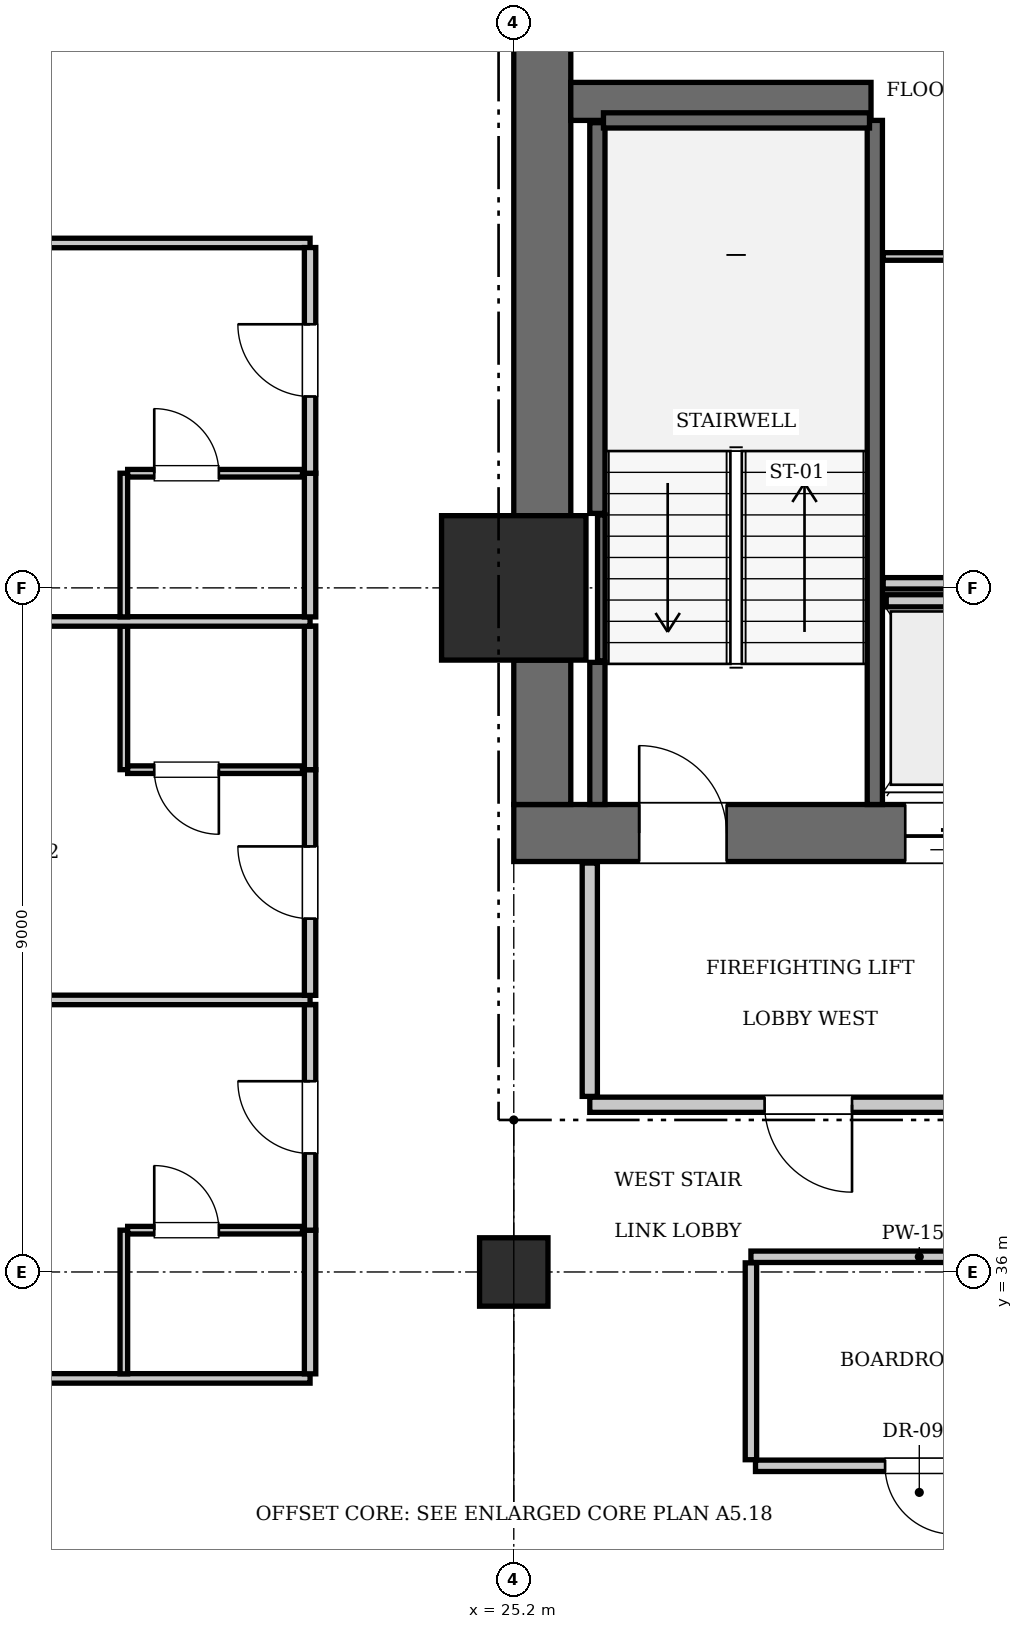
"""IFC4 building model, lengths in metres.
Left out: names, types, materials, properties, quantities, classifications, styles, units other than length and angle.
Written with IfcOpenShell. Run it as: python <this file> out.ifc"""

import sys

from ifc_helpers import new_model, si_unit, direction, frame, frame_2d, origin, origin_2d, place, context, subcontext, project, spatial, rectangle, extrude, element, fill, save


model = new_model("IFC4")
c1 = context("Model", 3, precision=1e-05, world=origin(), true_north=direction((0.0, 1.0)))
c2 = subcontext(c1, "Body", "Model", "MODEL_VIEW")
j1 = project(units=[si_unit("LENGTHUNIT", "METRE"), si_unit("PLANEANGLEUNIT", "RADIAN")], contexts=[c1])
p1 = place(None, origin())
s1 = spatial("IfcSite", under=j1, at=p1, CompositionType="ELEMENT")
p2 = place(p1, origin())
s2 = spatial("IfcBuilding", under=s1, at=p2, CompositionType="ELEMENT")
p3 = place(p2, frame((0.0, 0.0, 212.1)))
s3 = spatial("IfcBuildingStorey", under=s2, at=p3, CompositionType="ELEMENT", Elevation=212.1)
p4 = place(p3, frame((25.2, 45.0, 0.0), z_axis=(0.0, 0.0, 1.0), x_axis=(1.0, 0.0, 0.0)))
e1 = element("IfcColumn", 1, at=p4, inside=s3, PredefinedType="COLUMN", context=c2, shape_type="SweptSolid", body=[
    extrude(rectangle(XDim=1.9, YDim=1.9, at=origin_2d()), origin(), (0.0, 0.0, 1.0), 3.85),
])
p5 = place(p3, frame((25.2, 41.775, 0.0), z_axis=(0.0, 0.0, 1.0), x_axis=(1.0, 0.0, 0.0)))
e2 = element("IfcWall", 2, at=p5, inside=s3, PredefinedType="SHEAR", context=c2, shape_type="SweptSolid", body=[
    extrude(rectangle(XDim=6.8, YDim=0.75, at=frame_2d((3.4, 0.0))), origin(), (0.0, 0.0, 1.0), 3.85),
])
p6 = place(p5, frame((1.65, 0.0, 0.0)))
e3 = element("IfcOpeningElement", 3, at=p6, cuts=e2, PredefinedType="OPENING", context=c2, shape_type="SweptSolid", body=[
    extrude(rectangle(XDim=1.15, YDim=2.15, at=frame_2d((0.575, 1.075))), frame((0.0, 0.385, 0.0), z_axis=(0.0, -1.0, 0.0), x_axis=(1.0, 0.0, 0.0)), (0.0, 0.0, 1.0), 0.77),
])
p7 = place(p5, frame((5.15, 0.0, 0.0)))
e4 = element("IfcOpeningElement", 4, at=p7, cuts=e2, PredefinedType="OPENING", context=c2, shape_type="SweptSolid", body=[
    extrude(rectangle(XDim=1.1, YDim=2.2, at=frame_2d((0.55, 1.1))), frame((0.0, 0.385, 0.0), z_axis=(0.0, -1.0, 0.0), x_axis=(1.0, 0.0, 0.0)), (0.0, 0.0, 1.0), 0.77),
])
p8 = place(p3, frame((25.575, 42.15, 0.0), z_axis=(0.0, 0.0, 1.0), x_axis=(0.0, 1.0, 0.0)))
e5 = element("IfcWall", 5, at=p8, inside=s3, PredefinedType="SHEAR", context=c2, shape_type="SweptSolid", body=[
    extrude(rectangle(XDim=1.9, YDim=0.75, at=frame_2d((0.95, 0.0))), origin(), (0.0, 0.0, 1.0), 3.85),
])
p9 = place(p3, frame((25.575, 45.95, 0.0), z_axis=(0.0, 0.0, 1.0), x_axis=(0.0, 1.0, 0.0)))
e6 = element("IfcWall", 6, at=p9, inside=s3, PredefinedType="SHEAR", context=c2, shape_type="SweptSolid", body=[
    extrude(rectangle(XDim=7.3, YDim=0.75, at=frame_2d((3.65, 0.0))), origin(), (0.0, 0.0, 1.0), 3.85),
])
p10 = place(p3, frame((25.95, 51.4, 0.0), z_axis=(0.0, 0.0, 1.0), x_axis=(1.0, 0.0, 0.0)))
e7 = element("IfcWall", 7, at=p10, inside=s3, PredefinedType="SHEAR", context=c2, shape_type="SweptSolid", body=[
    extrude(rectangle(XDim=3.95, YDim=0.5, at=frame_2d((1.975, 0.0))), origin(), (0.0, 0.0, 1.0), 3.85),
])
p11 = place(p3, frame((25.2, 36.0, 0.0), z_axis=(0.0, 0.0, 1.0), x_axis=(1.0, 0.0, 0.0)))
e8 = element("IfcColumn", 8, at=p11, inside=s3, PredefinedType="COLUMN", context=c2, shape_type="SweptSolid", body=[
    extrude(rectangle(XDim=0.9, YDim=0.9, at=origin_2d()), origin(), (0.0, 0.0, 1.0), 3.85),
])
p12 = place(p3, frame((29.95, 42.15, 0.0), z_axis=(0.0, 0.0, 1.0), x_axis=(0.0, 1.0, 0.0)))
e9 = element("IfcWall", 9, at=p12, inside=s3, PredefinedType="SOLIDWALL", context=c2, shape_type="SweptSolid", body=[
    extrude(rectangle(XDim=9.0, YDim=0.2, at=frame_2d((4.5, 0.0))), origin(), (0.0, 0.0, 1.0), 3.61),
])
p13 = place(p3, frame((26.3, 42.15, 0.0), z_axis=(0.0, 0.0, 1.0), x_axis=(0.0, 1.0, 0.0)))
e10 = element("IfcWall", 10, at=p13, inside=s3, PredefinedType="SOLIDWALL", context=c2, shape_type="SweptSolid", body=[
    extrude(rectangle(XDim=1.87, YDim=0.2, at=frame_2d((0.935, 0.0))), origin(), (0.0, 0.0, 1.0), 3.61),
])
p14 = place(p3, frame((26.3, 45.98, 0.0), z_axis=(0.0, 0.0, 1.0), x_axis=(0.0, 1.0, 0.0)))
e11 = element("IfcWall", 11, at=p14, inside=s3, PredefinedType="SOLIDWALL", context=c2, shape_type="SweptSolid", body=[
    extrude(rectangle(XDim=5.14, YDim=0.2, at=frame_2d((2.57, 0.0))), origin(), (0.0, 0.0, 1.0), 3.61),
])
p15 = place(p3, frame((26.38, 51.15, 0.0), z_axis=(0.0, 0.0, 1.0), x_axis=(1.0, 0.0, 0.0)))
e12 = element("IfcWall", 12, at=p15, inside=s3, PredefinedType="SOLIDWALL", context=c2, shape_type="SweptSolid", body=[
    extrude(rectangle(XDim=3.5, YDim=0.2, at=frame_2d((1.75, 0.0))), origin(), (0.0, 0.0, 1.0), 3.61),
])
p16 = place(p3, frame((26.352, 44.04, 0.0), z_axis=(0.0, 0.0, 1.0), x_axis=(0.0, 1.0, 0.0)))
e13 = element("IfcWall", 13, at=p16, inside=s3, PredefinedType="SOLIDWALL", context=c2, shape_type="SweptSolid", body=[
    extrude(rectangle(XDim=1.92, YDim=0.1, at=frame_2d((0.96, 0.0))), origin(), (0.0, 0.0, 1.0), 3.61),
])
p17 = place(p3, frame((30.1, 44.83, 0.0), z_axis=(0.0, 0.0, 1.0), x_axis=(1.0, 0.0, 0.0)))
e14 = element("IfcWall", 14, at=p17, inside=s3, PredefinedType="SOLIDWALL", context=c2, shape_type="SweptSolid", body=[
    extrude(rectangle(XDim=1.6, YDim=0.16, at=frame_2d((0.8, 0.0))), origin(), (0.0, 0.0, 1.0), 3.61),
])
p18 = place(p3, frame((26.2, 38.2, 0.0), z_axis=(0.0, 0.0, 1.0), x_axis=(1.0, 0.0, 0.0)))
e15 = element("IfcWall", 15, at=p18, inside=s3, PredefinedType="PARTITIONING", context=c2, shape_type="SweptSolid", body=[
    extrude(rectangle(XDim=5.8, YDim=0.2, at=frame_2d((2.9, 0.0))), origin(), (0.0, 0.0, 1.0), 3.61),
])
p19 = place(p18, frame((2.3, 0.0, 0.0)))
e16 = element("IfcOpeningElement", 16, at=p19, cuts=e15, PredefinedType="OPENING", context=c2, shape_type="SweptSolid", body=[
    extrude(rectangle(XDim=1.15, YDim=2.15, at=frame_2d((0.575, 1.075))), frame((0.0, 0.11, 0.0), z_axis=(0.0, -1.0, 0.0), x_axis=(1.0, 0.0, 0.0)), (0.0, 0.0, 1.0), 0.22),
])
p20 = place(p3, frame((26.2, 38.31, 0.0), z_axis=(0.0, 0.0, 1.0), x_axis=(0.0, 1.0, 0.0)))
e17 = element("IfcWall", 17, at=p20, inside=s3, PredefinedType="PARTITIONING", context=c2, shape_type="SweptSolid", body=[
    extrude(rectangle(XDim=3.07, YDim=0.2, at=frame_2d((1.535, 0.0))), origin(), (0.0, 0.0, 1.0), 3.61),
])
p21 = place(p3, frame((30.06, 45.06, 0.0), z_axis=(0.0, 0.0, 1.0), x_axis=(1.0, 0.0, 0.0)))
e18 = element("IfcWall", 18, at=p21, inside=s3, PredefinedType="PARTITIONING", context=c2, shape_type="SweptSolid", body=[
    extrude(rectangle(XDim=3.18, YDim=0.15, at=frame_2d((1.59, 0.0))), origin(), (0.0, 0.0, 1.0), 3.61),
])
p22 = place(p3, frame((30.06, 49.36, 0.0), z_axis=(0.0, 0.0, 1.0), x_axis=(1.0, 0.0, 0.0)))
e19 = element("IfcWall", 19, at=p22, inside=s3, PredefinedType="PARTITIONING", context=c2, shape_type="SweptSolid", body=[
    extrude(rectangle(XDim=3.18, YDim=0.1, at=frame_2d((1.59, 0.0))), origin(), (0.0, 0.0, 1.0), 3.61),
])
p23 = place(p22, frame((1.95, 0.0, 0.0)))
e20 = element("IfcOpeningElement", 20, at=p23, cuts=e19, PredefinedType="OPENING", context=c2, shape_type="SweptSolid", body=[
    extrude(rectangle(XDim=0.8, YDim=2.05, at=frame_2d((0.4, 1.025))), frame((0.0, 0.06, 0.0), z_axis=(0.0, -1.0, 0.0), x_axis=(1.0, 0.0, 0.0)), (0.0, 0.0, 1.0), 0.12),
])
p24 = place(p3, frame((28.32, 36.2, 0.0), z_axis=(0.0, 0.0, 1.0), x_axis=(1.0, 0.0, 0.0)))
e21 = element("IfcWall", 21, at=p24, inside=s3, PredefinedType="PARTITIONING", context=c2, shape_type="SweptSolid", body=[
    extrude(rectangle(XDim=4.43, YDim=0.15, at=frame_2d((2.215, 0.0))), origin(), (0.0, 0.0, 1.0), 3.61),
])
p25 = place(p3, frame((28.32, 33.53, 0.0), z_axis=(0.0, 0.0, 1.0), x_axis=(0.0, 1.0, 0.0)))
e22 = element("IfcWall", 22, at=p25, inside=s3, PredefinedType="PARTITIONING", context=c2, shape_type="SweptSolid", body=[
    extrude(rectangle(XDim=2.59, YDim=0.15, at=frame_2d((1.295, 0.0))), origin(), (0.0, 0.0, 1.0), 3.61),
])
p26 = place(p3, frame((28.38, 33.45, 0.0), z_axis=(0.0, 0.0, 1.0), x_axis=(1.0, 0.0, 0.0)))
e23 = element("IfcWall", 23, at=p26, inside=s3, PredefinedType="PARTITIONING", context=c2, shape_type="SweptSolid", body=[
    extrude(rectangle(XDim=4.31, YDim=0.15, at=frame_2d((2.155, 0.0))), origin(), (0.0, 0.0, 1.0), 3.61),
])
p27 = place(p26, frame((1.705, 0.0, 0.0)))
e24 = element("IfcOpeningElement", 24, at=p27, cuts=e23, PredefinedType="OPENING", context=c2, shape_type="SweptSolid", body=[
    extrude(rectangle(XDim=0.9, YDim=2.1, at=frame_2d((0.45, 1.05))), frame((0.0, 0.085, 0.0), z_axis=(0.0, -1.0, 0.0), x_axis=(1.0, 0.0, 0.0)), (0.0, 0.0, 1.0), 0.17),
])
p28 = place(p3, frame((13.2, 34.6, 0.0), z_axis=(0.0, 0.0, 1.0), x_axis=(1.0, 0.0, 0.0)))
e25 = element("IfcWall", 25, at=p28, inside=s3, PredefinedType="PARTITIONING", context=c2, shape_type="SweptSolid", body=[
    extrude(rectangle(XDim=9.32, YDim=0.125, at=frame_2d((4.66, 0.0))), origin(), (0.0, 0.0, 1.0), 3.61),
])
p29 = place(p3, frame((17.24, 49.538, 0.0), z_axis=(0.0, 0.0, 1.0), x_axis=(1.0, 0.0, 0.0)))
e26 = element("IfcWall", 26, at=p29, inside=s3, PredefinedType="PARTITIONING", context=c2, shape_type="SweptSolid", body=[
    extrude(rectangle(XDim=5.28, YDim=0.125, at=frame_2d((2.64, 0.0))), origin(), (0.0, 0.0, 1.0), 3.61),
])
p30 = place(p3, frame((22.52, 34.66, 0.0), z_axis=(0.0, 0.0, 1.0), x_axis=(0.0, 1.0, 0.0)))
e27 = element("IfcWall", 27, at=p30, inside=s3, PredefinedType="PARTITIONING", context=c2, shape_type="SweptSolid", body=[
    extrude(rectangle(XDim=1.89, YDim=0.15, at=frame_2d((0.945, 0.0))), origin(), (0.0, 0.0, 1.0), 3.61),
])
p31 = place(p3, frame((22.52, 36.55, 0.0), z_axis=(0.0, 0.0, 1.0), x_axis=(0.0, 1.0, 0.0)))
e28 = element("IfcWall", 28, at=p31, inside=s3, PredefinedType="PARTITIONING", context=c2, shape_type="SweptSolid", body=[
    extrude(rectangle(XDim=2.969, YDim=0.15, at=frame_2d((1.485, 0.0))), origin(), (0.0, 0.0, 1.0), 3.61),
])
p32 = place(p31, frame((1.01, 0.0, 0.0)))
e29 = element("IfcOpeningElement", 29, at=p32, cuts=e28, PredefinedType="OPENING", context=c2, shape_type="SweptSolid", body=[
    extrude(rectangle(XDim=0.95, YDim=2.15, at=frame_2d((0.475, 1.075))), frame((0.0, 0.085, 0.0), z_axis=(0.0, -1.0, 0.0), x_axis=(1.0, 0.0, 0.0)), (0.0, 0.0, 1.0), 0.17),
])
p33 = place(p3, frame((20.07, 34.66, 0.0), z_axis=(0.0, 0.0, 1.0), x_axis=(0.0, 1.0, 0.0)))
e30 = element("IfcWall", 30, at=p33, inside=s3, PredefinedType="PARTITIONING", context=c2, shape_type="SweptSolid", body=[
    extrude(rectangle(XDim=1.89, YDim=0.1, at=frame_2d((0.945, 0.0))), origin(), (0.0, 0.0, 1.0), 3.61),
])
p34 = place(p3, frame((20.12, 36.55, 0.0), z_axis=(0.0, 0.0, 1.0), x_axis=(1.0, 0.0, 0.0)))
e31 = element("IfcWall", 31, at=p34, inside=s3, PredefinedType="PARTITIONING", context=c2, shape_type="SweptSolid", body=[
    extrude(rectangle(XDim=2.3, YDim=0.1, at=frame_2d((1.15, 0.0))), origin(), (0.0, 0.0, 1.0), 3.61),
])
p35 = place(p34, frame((0.35, 0.0, 0.0)))
e32 = element("IfcOpeningElement", 32, at=p35, cuts=e31, PredefinedType="OPENING", context=c2, shape_type="SweptSolid", body=[
    extrude(rectangle(XDim=0.85, YDim=2.1, at=frame_2d((0.425, 1.05))), frame((0.0, 0.06, 0.0), z_axis=(0.0, -1.0, 0.0), x_axis=(1.0, 0.0, 0.0)), (0.0, 0.0, 1.0), 0.12),
])
p36 = place(p3, frame((13.2, 39.579, 0.0), z_axis=(0.0, 0.0, 1.0), x_axis=(1.0, 0.0, 0.0)))
e33 = element("IfcWall", 33, at=p36, inside=s3, PredefinedType="PARTITIONING", context=c2, shape_type="SweptSolid", body=[
    extrude(rectangle(XDim=9.32, YDim=0.125, at=frame_2d((4.66, 0.0))), origin(), (0.0, 0.0, 1.0), 3.61),
])
p37 = place(p3, frame((22.52, 39.639, 0.0), z_axis=(0.0, 0.0, 1.0), x_axis=(0.0, 1.0, 0.0)))
e34 = element("IfcWall", 34, at=p37, inside=s3, PredefinedType="PARTITIONING", context=c2, shape_type="SweptSolid", body=[
    extrude(rectangle(XDim=2.969, YDim=0.15, at=frame_2d((1.485, 0.0))), origin(), (0.0, 0.0, 1.0), 3.61),
])
p38 = place(p37, frame((1.01, 0.0, 0.0)))
e35 = element("IfcOpeningElement", 35, at=p38, cuts=e34, PredefinedType="OPENING", context=c2, shape_type="SweptSolid", body=[
    extrude(rectangle(XDim=0.95, YDim=2.15, at=frame_2d((0.475, 1.075))), frame((0.0, 0.085, 0.0), z_axis=(0.0, -1.0, 0.0), x_axis=(1.0, 0.0, 0.0)), (0.0, 0.0, 1.0), 0.17),
])
p39 = place(p3, frame((22.52, 42.608, 0.0), z_axis=(0.0, 0.0, 1.0), x_axis=(0.0, 1.0, 0.0)))
e36 = element("IfcWall", 36, at=p39, inside=s3, PredefinedType="PARTITIONING", context=c2, shape_type="SweptSolid", body=[
    extrude(rectangle(XDim=1.89, YDim=0.15, at=frame_2d((0.945, 0.0))), origin(), (0.0, 0.0, 1.0), 3.61),
])
p40 = place(p3, frame((20.07, 42.608, 0.0), z_axis=(0.0, 0.0, 1.0), x_axis=(0.0, 1.0, 0.0)))
e37 = element("IfcWall", 37, at=p40, inside=s3, PredefinedType="PARTITIONING", context=c2, shape_type="SweptSolid", body=[
    extrude(rectangle(XDim=1.89, YDim=0.1, at=frame_2d((0.945, 0.0))), origin(), (0.0, 0.0, 1.0), 3.61),
])
p41 = place(p3, frame((20.12, 42.608, 0.0), z_axis=(0.0, 0.0, 1.0), x_axis=(1.0, 0.0, 0.0)))
e38 = element("IfcWall", 38, at=p41, inside=s3, PredefinedType="PARTITIONING", context=c2, shape_type="SweptSolid", body=[
    extrude(rectangle(XDim=2.3, YDim=0.1, at=frame_2d((1.15, 0.0))), origin(), (0.0, 0.0, 1.0), 3.61),
])
p42 = place(p41, frame((0.35, 0.0, 0.0)))
e39 = element("IfcOpeningElement", 39, at=p42, cuts=e38, PredefinedType="OPENING", context=c2, shape_type="SweptSolid", body=[
    extrude(rectangle(XDim=0.85, YDim=2.1, at=frame_2d((0.425, 1.05))), frame((0.0, 0.06, 0.0), z_axis=(0.0, -1.0, 0.0), x_axis=(1.0, 0.0, 0.0)), (0.0, 0.0, 1.0), 0.12),
])
p43 = place(p3, frame((13.2, 44.558, 0.0), z_axis=(0.0, 0.0, 1.0), x_axis=(1.0, 0.0, 0.0)))
e40 = element("IfcWall", 40, at=p43, inside=s3, PredefinedType="PARTITIONING", context=c2, shape_type="SweptSolid", body=[
    extrude(rectangle(XDim=9.32, YDim=0.125, at=frame_2d((4.66, 0.0))), origin(), (0.0, 0.0, 1.0), 3.61),
])
p44 = place(p3, frame((22.52, 44.618, 0.0), z_axis=(0.0, 0.0, 1.0), x_axis=(0.0, 1.0, 0.0)))
e41 = element("IfcWall", 41, at=p44, inside=s3, PredefinedType="PARTITIONING", context=c2, shape_type="SweptSolid", body=[
    extrude(rectangle(XDim=1.89, YDim=0.15, at=frame_2d((0.945, 0.0))), origin(), (0.0, 0.0, 1.0), 3.61),
])
p45 = place(p3, frame((22.52, 46.508, 0.0), z_axis=(0.0, 0.0, 1.0), x_axis=(0.0, 1.0, 0.0)))
e42 = element("IfcWall", 42, at=p45, inside=s3, PredefinedType="PARTITIONING", context=c2, shape_type="SweptSolid", body=[
    extrude(rectangle(XDim=2.969, YDim=0.15, at=frame_2d((1.485, 0.0))), origin(), (0.0, 0.0, 1.0), 3.61),
])
p46 = place(p45, frame((1.01, 0.0, 0.0)))
e43 = element("IfcOpeningElement", 43, at=p46, cuts=e42, PredefinedType="OPENING", context=c2, shape_type="SweptSolid", body=[
    extrude(rectangle(XDim=0.95, YDim=2.15, at=frame_2d((0.475, 1.075))), frame((0.0, 0.085, 0.0), z_axis=(0.0, -1.0, 0.0), x_axis=(1.0, 0.0, 0.0)), (0.0, 0.0, 1.0), 0.17),
])
p47 = place(p3, frame((20.07, 44.618, 0.0), z_axis=(0.0, 0.0, 1.0), x_axis=(0.0, 1.0, 0.0)))
e44 = element("IfcWall", 44, at=p47, inside=s3, PredefinedType="PARTITIONING", context=c2, shape_type="SweptSolid", body=[
    extrude(rectangle(XDim=1.89, YDim=0.1, at=frame_2d((0.945, 0.0))), origin(), (0.0, 0.0, 1.0), 3.61),
])
p48 = place(p3, frame((20.12, 46.508, 0.0), z_axis=(0.0, 0.0, 1.0), x_axis=(1.0, 0.0, 0.0)))
e45 = element("IfcWall", 45, at=p48, inside=s3, PredefinedType="PARTITIONING", context=c2, shape_type="SweptSolid", body=[
    extrude(rectangle(XDim=2.3, YDim=0.1, at=frame_2d((1.15, 0.0))), origin(), (0.0, 0.0, 1.0), 3.61),
])
p49 = place(p48, frame((0.35, 0.0, 0.0)))
e46 = element("IfcOpeningElement", 46, at=p49, cuts=e45, PredefinedType="OPENING", context=c2, shape_type="SweptSolid", body=[
    extrude(rectangle(XDim=0.85, YDim=2.1, at=frame_2d((0.425, 1.05))), frame((0.0, 0.06, 0.0), z_axis=(0.0, -1.0, 0.0), x_axis=(1.0, 0.0, 0.0)), (0.0, 0.0, 1.0), 0.12),
])
p50 = place(p6, origin())
e47 = element("IfcDoor", 47, at=p50, inside=s3, OperationType="SINGLE_SWING_LEFT", PredefinedType="DOOR", context=c2, shape_type="SweptSolid", body=[
    extrude(rectangle(XDim=1.15, YDim=2.15, at=frame_2d((0.575, 1.075))), frame((0.0, 0.025, 0.0), z_axis=(0.0, -1.0, 0.0), x_axis=(1.0, 0.0, 0.0)), (0.0, 0.0, 1.0), 0.05),
])
fill(e3, e47)
p51 = place(p7, frame((1.1, 0.0, 0.0), z_axis=(0.0, 0.0, 1.0), x_axis=(-1.0, 0.0, 0.0)))
e48 = element("IfcDoor", 48, at=p51, inside=s3, OperationType="SLIDING_TO_LEFT", PredefinedType="DOOR", context=c2, shape_type="SweptSolid", body=[
    extrude(rectangle(XDim=1.1, YDim=2.2, at=frame_2d((0.55, 1.1))), frame((0.0, 0.025, 0.0), z_axis=(0.0, -1.0, 0.0), x_axis=(1.0, 0.0, 0.0)), (0.0, 0.0, 1.0), 0.05),
])
fill(e4, e48)
p52 = place(p19, frame((1.15, 0.0, 0.0), z_axis=(0.0, 0.0, 1.0), x_axis=(-1.0, 0.0, 0.0)))
e49 = element("IfcDoor", 49, at=p52, inside=s3, OperationType="SINGLE_SWING_LEFT", PredefinedType="DOOR", context=c2, shape_type="SweptSolid", body=[
    extrude(rectangle(XDim=1.15, YDim=2.15, at=frame_2d((0.575, 1.075))), frame((0.0, 0.025, 0.0), z_axis=(0.0, -1.0, 0.0), x_axis=(1.0, 0.0, 0.0)), (0.0, 0.0, 1.0), 0.05),
])
fill(e16, e49)
p53 = place(p27, frame((0.9, 0.0, 0.0), z_axis=(0.0, 0.0, 1.0), x_axis=(-1.0, 0.0, 0.0)))
e50 = element("IfcDoor", 50, at=p53, inside=s3, OperationType="SINGLE_SWING_LEFT", PredefinedType="DOOR", context=c2, shape_type="SweptSolid", body=[
    extrude(rectangle(XDim=0.9, YDim=2.1, at=frame_2d((0.45, 1.05))), frame((0.0, 0.025, 0.0), z_axis=(0.0, -1.0, 0.0), x_axis=(1.0, 0.0, 0.0)), (0.0, 0.0, 1.0), 0.05),
])
fill(e24, e50)
p54 = place(p35, origin())
e51 = element("IfcDoor", 51, at=p54, inside=s3, OperationType="SINGLE_SWING_LEFT", PredefinedType="DOOR", context=c2, shape_type="SweptSolid", body=[
    extrude(rectangle(XDim=0.85, YDim=2.1, at=frame_2d((0.425, 1.05))), frame((0.0, 0.025, 0.0), z_axis=(0.0, -1.0, 0.0), x_axis=(1.0, 0.0, 0.0)), (0.0, 0.0, 1.0), 0.05),
])
fill(e32, e51)
p55 = place(p32, origin())
e52 = element("IfcDoor", 52, at=p55, inside=s3, OperationType="SINGLE_SWING_RIGHT", PredefinedType="DOOR", context=c2, shape_type="SweptSolid", body=[
    extrude(rectangle(XDim=0.95, YDim=2.15, at=frame_2d((0.475, 1.075))), frame((0.0, 0.025, 0.0), z_axis=(0.0, -1.0, 0.0), x_axis=(1.0, 0.0, 0.0)), (0.0, 0.0, 1.0), 0.05),
])
fill(e29, e52)
p56 = place(p42, frame((0.85, 0.0, 0.0), z_axis=(0.0, 0.0, 1.0), x_axis=(-1.0, 0.0, 0.0)))
e53 = element("IfcDoor", 53, at=p56, inside=s3, OperationType="SINGLE_SWING_LEFT", PredefinedType="DOOR", context=c2, shape_type="SweptSolid", body=[
    extrude(rectangle(XDim=0.85, YDim=2.1, at=frame_2d((0.425, 1.05))), frame((0.0, 0.025, 0.0), z_axis=(0.0, -1.0, 0.0), x_axis=(1.0, 0.0, 0.0)), (0.0, 0.0, 1.0), 0.05),
])
fill(e39, e53)
p57 = place(p38, origin())
e54 = element("IfcDoor", 54, at=p57, inside=s3, OperationType="SINGLE_SWING_RIGHT", PredefinedType="DOOR", context=c2, shape_type="SweptSolid", body=[
    extrude(rectangle(XDim=0.95, YDim=2.15, at=frame_2d((0.475, 1.075))), frame((0.0, 0.025, 0.0), z_axis=(0.0, -1.0, 0.0), x_axis=(1.0, 0.0, 0.0)), (0.0, 0.0, 1.0), 0.05),
])
fill(e35, e54)
p58 = place(p49, origin())
e55 = element("IfcDoor", 55, at=p58, inside=s3, OperationType="SINGLE_SWING_LEFT", PredefinedType="DOOR", context=c2, shape_type="SweptSolid", body=[
    extrude(rectangle(XDim=0.85, YDim=2.1, at=frame_2d((0.425, 1.05))), frame((0.0, 0.025, 0.0), z_axis=(0.0, -1.0, 0.0), x_axis=(1.0, 0.0, 0.0)), (0.0, 0.0, 1.0), 0.05),
])
fill(e46, e55)
p59 = place(p46, origin())
e56 = element("IfcDoor", 56, at=p59, inside=s3, OperationType="SINGLE_SWING_RIGHT", PredefinedType="DOOR", context=c2, shape_type="SweptSolid", body=[
    extrude(rectangle(XDim=0.95, YDim=2.15, at=frame_2d((0.475, 1.075))), frame((0.0, 0.025, 0.0), z_axis=(0.0, -1.0, 0.0), x_axis=(1.0, 0.0, 0.0)), (0.0, 0.0, 1.0), 0.05),
])
fill(e43, e56)
save(model, sys.argv[1])
